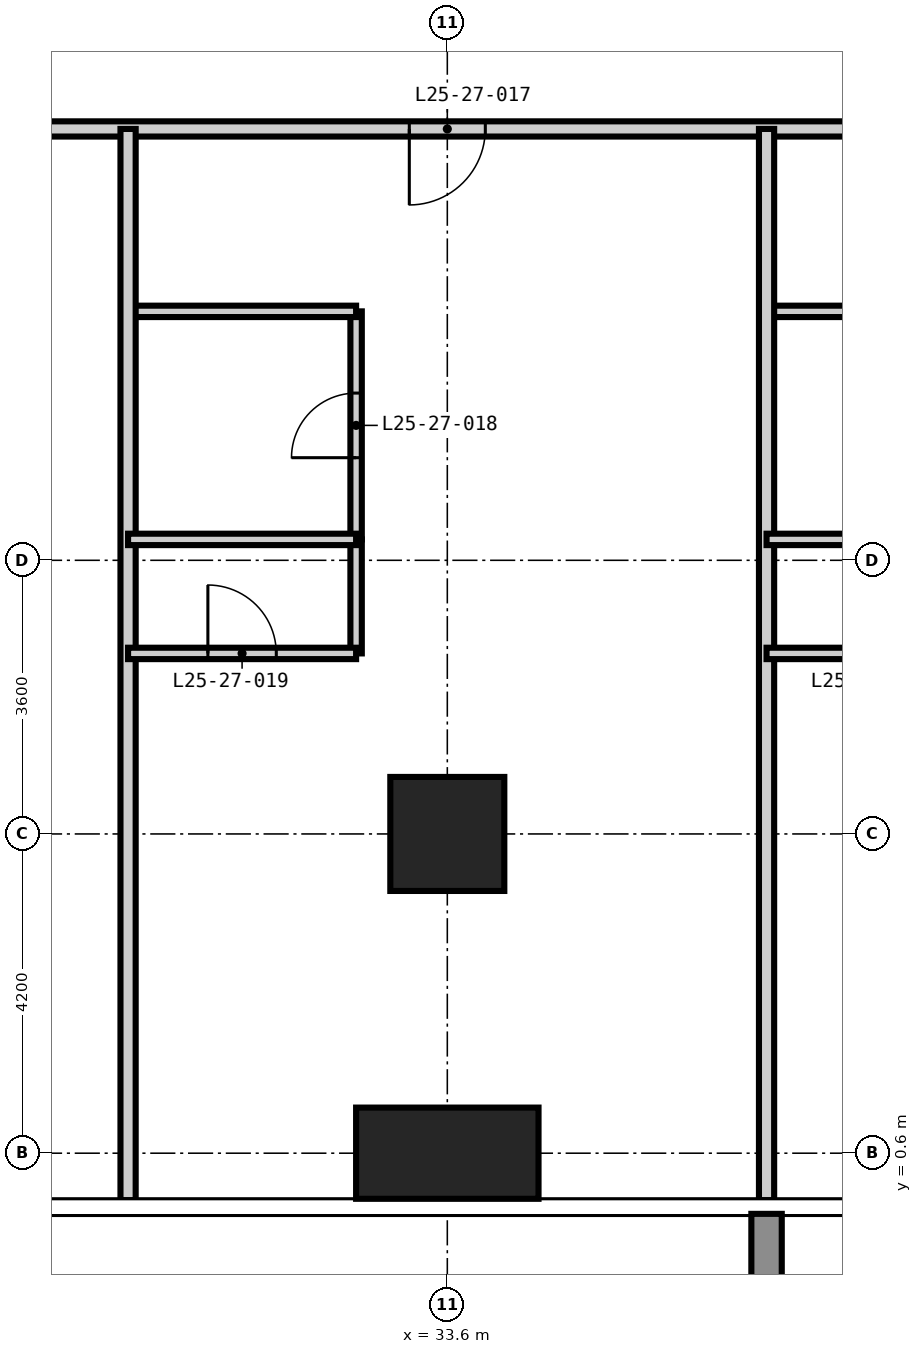
"""IFC4 building model, lengths in metres.
Left out: names, types, materials, properties, quantities, classifications, styles, units other than length and angle.
Written with IfcOpenShell. Run it as: python <this file> out.ifc"""

import sys

from ifc_helpers import new_model, si_unit, direction, frame, frame_2d, origin, origin_2d, place, context, subcontext, project, spatial, rectangle, extrude, element, fill, save


model = new_model("IFC4")
c1 = context("Model", 3, precision=1e-05, world=origin(), true_north=direction((0.0, 1.0)))
c2 = subcontext(c1, "Body", "Model", "MODEL_VIEW")
j1 = project(units=[si_unit("LENGTHUNIT", "METRE"), si_unit("PLANEANGLEUNIT", "RADIAN")], contexts=[c1])
p1 = place(None, origin())
s1 = spatial("IfcSite", under=j1, at=p1, CompositionType="ELEMENT")
p2 = place(p1, origin())
s2 = spatial("IfcBuilding", under=s1, at=p2, CompositionType="ELEMENT")
p3 = place(p2, frame((0.0, 0.0, 100.8)))
s3 = spatial("IfcBuildingStorey", under=s2, at=p3, CompositionType="ELEMENT", Elevation=100.8)
p4 = place(p3, frame((33.6, 0.6, -0.35), z_axis=(0.0, 0.0, 1.0), x_axis=(1.0, 0.0, 0.0)))
e1 = element("IfcColumn", 1, at=p4, inside=s3, PredefinedType="COLUMN", context=c2, shape_type="SweptSolid", body=[
    extrude(rectangle(XDim=2.4, YDim=1.2, at=origin_2d()), origin(), (0.0, 0.0, 1.0), 3.6),
])
p5 = place(p3, frame((33.6, 4.8, -0.35), z_axis=(0.0, 0.0, 1.0), x_axis=(1.0, 0.0, 0.0)))
e2 = element("IfcColumn", 2, at=p5, inside=s3, PredefinedType="COLUMN", context=c2, shape_type="SweptSolid", body=[
    extrude(rectangle(XDim=1.5, YDim=1.5, at=origin_2d()), origin(), (0.0, 0.0, 1.0), 3.6),
])
p6 = place(p3, frame((32.4, 8.675, 0.0), z_axis=(0.0, 0.0, 1.0), x_axis=(0.0, 1.0, 0.0)))
e3 = element("IfcWall", 3, at=p6, inside=s3, PredefinedType="PARTITIONING", context=c2, shape_type="SweptSolid", body=[
    extrude(rectangle(XDim=3.0, YDim=0.15, at=frame_2d((1.5, 0.0))), origin(), (0.0, 0.0, 1.0), 3.25),
])
p7 = place(p6, frame((1.075, 0.0, 0.0)))
e4 = element("IfcOpeningElement", 4, at=p7, cuts=e3, PredefinedType="OPENING", context=c2, shape_type="SweptSolid", body=[
    extrude(rectangle(XDim=0.85, YDim=2.1, at=frame_2d((0.425, 1.05))), frame((0.0, 0.085, 0.0), z_axis=(0.0, -1.0, 0.0), x_axis=(1.0, 0.0, 0.0)), (0.0, 0.0, 1.0), 0.17),
])
for number, where, z_axis, x_axis in (
    (5, (29.4, 11.675, 0.0), (0.0, 0.0, 1.0), (1.0, 0.0, 0.0)),
    (6, (37.8, 11.675, 0.0), (0.0, 0.0, 1.0), (1.0, 0.0, 0.0)),
):
    element("IfcWall", number, at=place(p3, frame(where, z_axis=z_axis, x_axis=x_axis)), inside=s3, PredefinedType="PARTITIONING", context=c2, shape_type="SweptSolid", body=[
        extrude(rectangle(XDim=3.0, YDim=0.15, at=frame_2d((1.5, 0.0))), origin(), (0.0, 0.0, 1.0), 3.25),
    ])
p8 = place(p3, frame((45.925, 14.075, 0.0), z_axis=(0.0, 0.0, 1.0), x_axis=(-1.0, 0.0, 0.0)))
e7 = element("IfcWall", 7, at=p8, inside=s3, PredefinedType="PARTITIONING", context=c2, shape_type="SweptSolid", body=[
    extrude(rectangle(XDim=33.325, YDim=0.2, at=frame_2d((16.663, 0.0))), origin(), (0.0, 0.0, 1.0), 3.25),
])
p9 = place(p8, frame((26.525, 0.0, 0.0)))
e8 = element("IfcOpeningElement", 8, at=p9, cuts=e7, PredefinedType="OPENING", context=c2, shape_type="SweptSolid", body=[
    extrude(rectangle(XDim=1.0, YDim=2.2, at=frame_2d((0.5, 1.1))), frame((0.0, 0.11, 0.0), z_axis=(0.0, -1.0, 0.0), x_axis=(1.0, 0.0, 0.0)), (0.0, 0.0, 1.0), 0.22),
])
p10 = place(p8, frame((20.225, 0.0, 0.0)))
e9 = element("IfcOpeningElement", 9, at=p10, cuts=e7, PredefinedType="OPENING", context=c2, shape_type="SweptSolid", body=[
    extrude(rectangle(XDim=1.0, YDim=2.2, at=frame_2d((0.5, 1.1))), frame((0.0, 0.11, 0.0), z_axis=(0.0, -1.0, 0.0), x_axis=(1.0, 0.0, 0.0)), (0.0, 0.0, 1.0), 0.22),
])
p11 = place(p8, frame((11.825, 0.0, 0.0)))
e10 = element("IfcOpeningElement", 10, at=p11, cuts=e7, PredefinedType="OPENING", context=c2, shape_type="SweptSolid", body=[
    extrude(rectangle(XDim=1.0, YDim=2.2, at=frame_2d((0.5, 1.1))), frame((0.0, 0.11, 0.0), z_axis=(0.0, -1.0, 0.0), x_axis=(1.0, 0.0, 0.0)), (0.0, 0.0, 1.0), 0.22),
])
p12 = place(p8, frame((5.525, 0.0, 0.0)))
e11 = element("IfcOpeningElement", 11, at=p12, cuts=e7, PredefinedType="OPENING", context=c2, shape_type="SweptSolid", body=[
    extrude(rectangle(XDim=1.0, YDim=2.2, at=frame_2d((0.5, 1.1))), frame((0.0, 0.11, 0.0), z_axis=(0.0, -1.0, 0.0), x_axis=(1.0, 0.0, 0.0)), (0.0, 0.0, 1.0), 0.22),
])
for number, where, z_axis, x_axis in (
    (12, (29.4, -0.018, 0.0), (0.0, 0.0, 1.0), (0.0, 1.0, 0.0)),
    (13, (37.8, -0.018, 0.0), (0.0, 0.0, 1.0), (0.0, 1.0, 0.0)),
):
    element("IfcWall", number, at=place(p3, frame(where, z_axis=z_axis, x_axis=x_axis)), inside=s3, PredefinedType="PARTITIONING", context=c2, shape_type="SweptSolid", body=[
        extrude(rectangle(XDim=14.093, YDim=0.2, at=frame_2d((7.046, 0.0))), origin(), (0.0, 0.0, 1.0), 3.25),
    ])
p13 = place(p3, frame((32.4, 7.175, 0.0), z_axis=(0.0, 0.0, 1.0), x_axis=(0.0, 1.0, 0.0)))
e14 = element("IfcWall", 14, at=p13, inside=s3, PredefinedType="PARTITIONING", context=c2, shape_type="SweptSolid", body=[
    extrude(rectangle(XDim=1.5, YDim=0.15, at=frame_2d((0.75, 0.0))), origin(), (0.0, 0.0, 1.0), 3.25),
])
p14 = place(p3, frame((29.4, 7.175, 0.0), z_axis=(0.0, 0.0, 1.0), x_axis=(1.0, 0.0, 0.0)))
e15 = element("IfcWall", 15, at=p14, inside=s3, PredefinedType="PARTITIONING", context=c2, shape_type="SweptSolid", body=[
    extrude(rectangle(XDim=3.0, YDim=0.15, at=frame_2d((1.5, 0.0))), origin(), (0.0, 0.0, 1.0), 3.25),
])
p15 = place(p14, frame((1.05, 0.0, 0.0)))
e16 = element("IfcOpeningElement", 16, at=p15, cuts=e15, PredefinedType="OPENING", context=c2, shape_type="SweptSolid", body=[
    extrude(rectangle(XDim=0.9, YDim=2.1, at=frame_2d((0.45, 1.05))), frame((0.0, 0.085, 0.0), z_axis=(0.0, -1.0, 0.0), x_axis=(1.0, 0.0, 0.0)), (0.0, 0.0, 1.0), 0.17),
])
p16 = place(p3, frame((37.8, 7.175, 0.0), z_axis=(0.0, 0.0, 1.0), x_axis=(1.0, 0.0, 0.0)))
e17 = element("IfcWall", 17, at=p16, inside=s3, PredefinedType="PARTITIONING", context=c2, shape_type="SweptSolid", body=[
    extrude(rectangle(XDim=3.0, YDim=0.15, at=frame_2d((1.5, 0.0))), origin(), (0.0, 0.0, 1.0), 3.25),
])
p17 = place(p16, frame((1.05, 0.0, 0.0)))
e18 = element("IfcOpeningElement", 18, at=p17, cuts=e17, PredefinedType="OPENING", context=c2, shape_type="SweptSolid", body=[
    extrude(rectangle(XDim=0.9, YDim=2.1, at=frame_2d((0.45, 1.05))), frame((0.0, 0.085, 0.0), z_axis=(0.0, -1.0, 0.0), x_axis=(1.0, 0.0, 0.0)), (0.0, 0.0, 1.0), 0.17),
])
for number, where, z_axis, x_axis in (
    (19, (29.4, 8.675, 0.0), (0.0, 0.0, 1.0), (1.0, 0.0, 0.0)),
    (20, (37.8, 8.675, 0.0), (0.0, 0.0, 1.0), (1.0, 0.0, 0.0)),
):
    element("IfcWall", number, at=place(p3, frame(where, z_axis=z_axis, x_axis=x_axis)), inside=s3, PredefinedType="PARTITIONING", context=c2, shape_type="SweptSolid", body=[
        extrude(rectangle(XDim=3.0, YDim=0.15, at=frame_2d((1.5, 0.0))), origin(), (0.0, 0.0, 1.0), 3.25),
    ])
p18 = place(p11, origin())
e21 = element("IfcDoor", 21, at=p18, inside=s3, OperationType="SINGLE_SWING_RIGHT", PredefinedType="DOOR", context=c2, shape_type="SweptSolid", body=[
    extrude(rectangle(XDim=1.0, YDim=2.2, at=frame_2d((0.5, 1.1))), frame((0.0, 0.025, 0.0), z_axis=(0.0, -1.0, 0.0), x_axis=(1.0, 0.0, 0.0)), (0.0, 0.0, 1.0), 0.05),
])
fill(e10, e21)
p19 = place(p7, origin())
e22 = element("IfcDoor", 22, at=p19, inside=s3, OperationType="SINGLE_SWING_LEFT", PredefinedType="DOOR", context=c2, shape_type="SweptSolid", body=[
    extrude(rectangle(XDim=0.85, YDim=2.1, at=frame_2d((0.425, 1.05))), frame((0.0, 0.025, 0.0), z_axis=(0.0, -1.0, 0.0), x_axis=(1.0, 0.0, 0.0)), (0.0, 0.0, 1.0), 0.05),
])
fill(e4, e22)
p20 = place(p15, origin())
e23 = element("IfcDoor", 23, at=p20, inside=s3, OperationType="SINGLE_SWING_LEFT", PredefinedType="DOOR", context=c2, shape_type="SweptSolid", body=[
    extrude(rectangle(XDim=0.9, YDim=2.1, at=frame_2d((0.45, 1.05))), frame((0.0, 0.025, 0.0), z_axis=(0.0, -1.0, 0.0), x_axis=(1.0, 0.0, 0.0)), (0.0, 0.0, 1.0), 0.05),
])
fill(e16, e23)
save(model, sys.argv[1])
